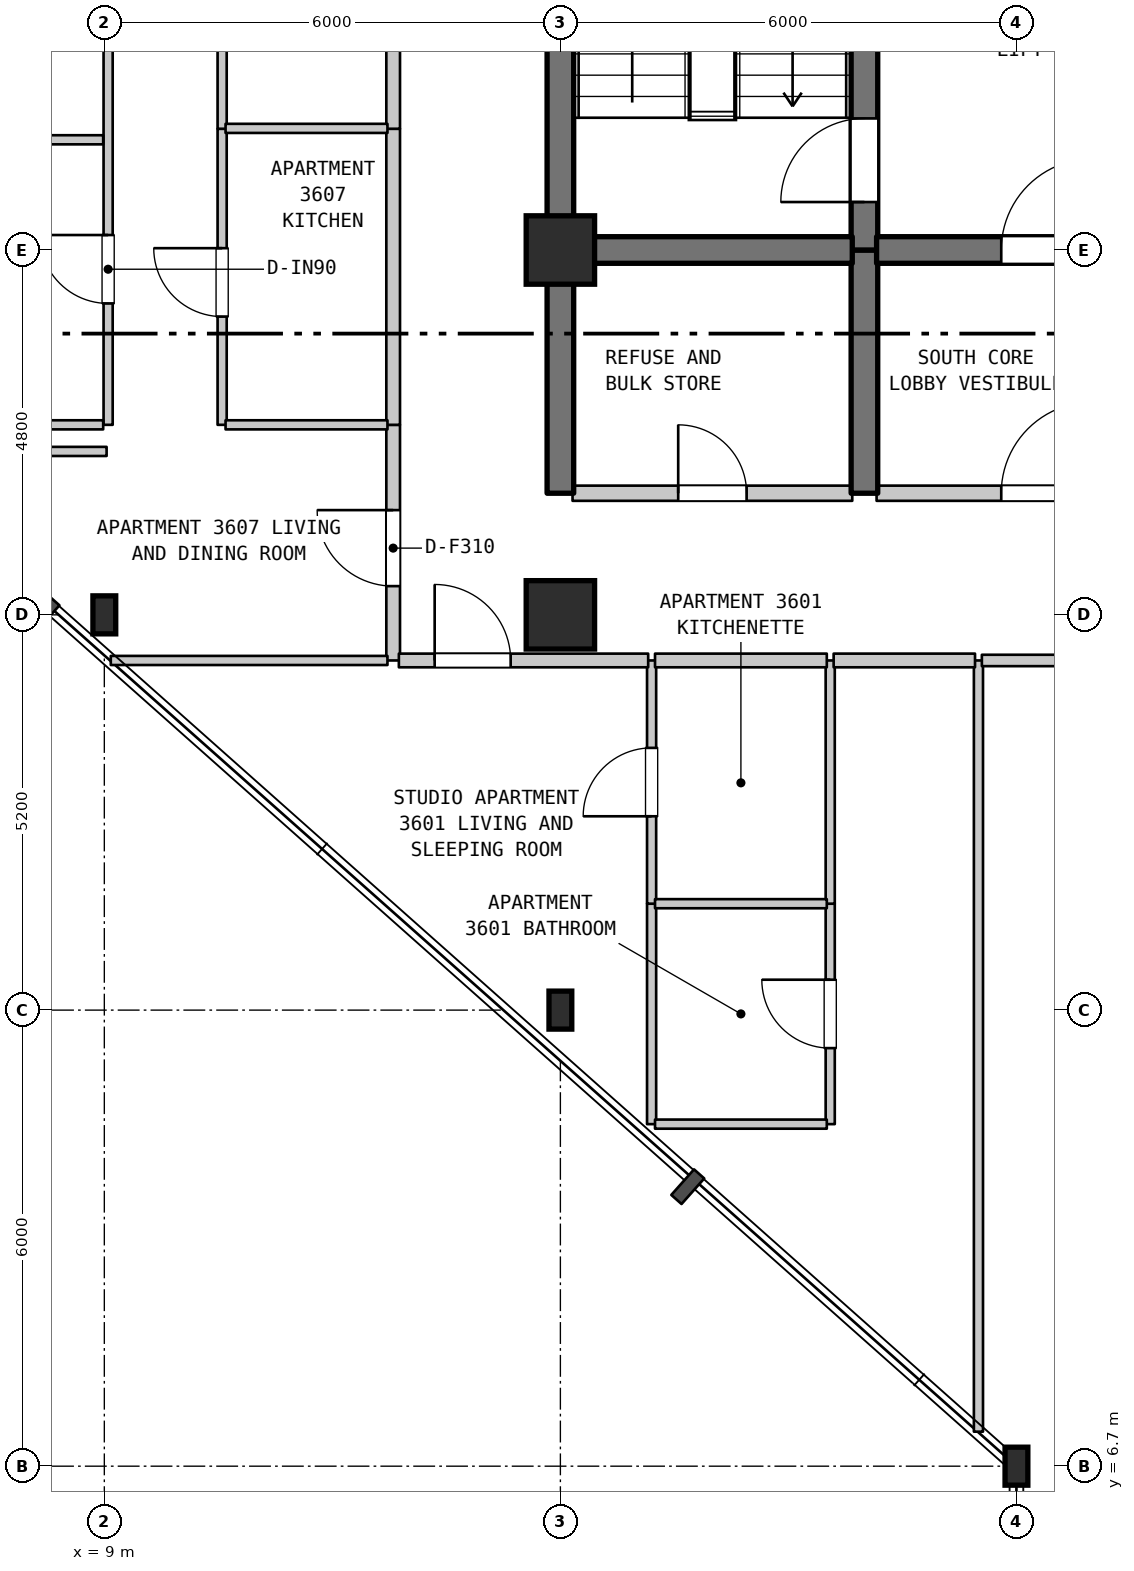
"""IFC4 building model, lengths in metres.
Left out: names, types, materials, properties, quantities, classifications, styles, units other than length and angle.
Written with IfcOpenShell. Run it as: python <this file> out.ifc"""

import sys

from ifc_helpers import new_model, si_unit, direction, frame, frame_2d, origin, origin_2d, place, context, subcontext, project, spatial, rectangle, i_section, extrude, element, fill, save


model = new_model("IFC4")
c1 = context("Model", 3, precision=1e-05, world=origin(), true_north=direction((0.0, 1.0)))
c2 = subcontext(c1, "Body", "Model", "MODEL_VIEW")
j1 = project(units=[si_unit("LENGTHUNIT", "METRE"), si_unit("PLANEANGLEUNIT", "RADIAN")], contexts=[c1])
p1 = place(None, origin())
s1 = spatial("IfcSite", under=j1, at=p1, CompositionType="ELEMENT")
p2 = place(p1, origin())
s2 = spatial("IfcBuilding", under=s1, at=p2, CompositionType="ELEMENT")
p3 = place(p2, frame((0.0, 0.0, 148.3)))
s3 = spatial("IfcBuildingStorey", under=s2, at=p3, CompositionType="ELEMENT", Elevation=148.3)
for number, where, z_axis, x_axis in (
    (1, (9.0, 17.9, 0.0), (0.0, 0.0, 1.0), (1.0, 0.0, 0.0)),
    (2, (15.0, 12.7, 0.0), (0.0, 0.0, 1.0), (1.0, 0.0, 0.0)),
):
    element("IfcColumn", number, at=place(p3, frame(where, z_axis=z_axis, x_axis=x_axis)), inside=s3, PredefinedType="COLUMN", context=c2, shape_type="SweptSolid", body=[
        extrude(i_section(OverallWidth=0.3, OverallDepth=0.5, WebThickness=0.014, FlangeThickness=0.028, FilletRadius=0.027, at=origin_2d()), origin(), (0.0, 0.0, 1.0), 3.7),
    ])
for number, where, z_axis, x_axis in (
    (3, (15.0, 17.9, 0.0), (0.0, 0.0, 1.0), (1.0, 0.0, 0.0)),
    (4, (15.0, 22.7, 0.0), (0.0, 0.0, 1.0), (1.0, 0.0, 0.0)),
):
    element("IfcColumn", number, at=place(p3, frame(where, z_axis=z_axis, x_axis=x_axis)), inside=s3, PredefinedType="COLUMN", context=c2, shape_type="SweptSolid", body=[
        extrude(rectangle(XDim=0.9, YDim=0.9, at=origin_2d()), origin(), (0.0, 0.0, 1.0), 3.7),
    ])
p4 = place(p3, frame((21.0, 6.7, 0.0), z_axis=(0.0, 0.0, 1.0), x_axis=(1.0, 0.0, 0.0)))
e5 = element("IfcColumn", 5, at=p4, inside=s3, PredefinedType="COLUMN", context=c2, shape_type="SweptSolid", body=[
    extrude(i_section(OverallWidth=0.3, OverallDepth=0.5, WebThickness=0.014, FlangeThickness=0.028, FilletRadius=0.027, at=origin_2d()), origin(), (0.0, 0.0, 1.0), 3.7),
])
p5 = place(p3, frame((9.05, 20.4, 0.0), z_axis=(0.0, 0.0, 1.0), x_axis=(0.0, 1.0, 0.0)))
e6 = element("IfcWall", 6, at=p5, inside=s3, PredefinedType="PARTITIONING", context=c2, shape_type="SweptSolid", body=[
    extrude(rectangle(XDim=7.49, YDim=0.12, at=frame_2d((3.745, 0.0))), origin(), (0.0, 0.0, 1.0), 2.785),
])
p6 = place(p5, frame((1.597, 0.0, 0.0)))
e7 = element("IfcOpeningElement", 7, at=p6, cuts=e6, PredefinedType="OPENING", context=c2, shape_type="SweptSolid", body=[
    extrude(rectangle(XDim=0.9, YDim=2.15, at=frame_2d((0.45, 1.075))), frame((0.0, 0.07, 0.0), z_axis=(0.0, -1.0, 0.0), x_axis=(1.0, 0.0, 0.0)), (0.0, 0.0, 1.0), 0.14),
])
p7 = place(p5, frame((4.992, 0.0, 0.0)))
e8 = element("IfcOpeningElement", 8, at=p7, cuts=e6, PredefinedType="OPENING", context=c2, shape_type="SweptSolid", body=[
    extrude(rectangle(XDim=0.9, YDim=2.15, at=frame_2d((0.45, 1.075))), frame((0.0, 0.07, 0.0), z_axis=(0.0, -1.0, 0.0), x_axis=(1.0, 0.0, 0.0)), (0.0, 0.0, 1.0), 0.14),
])
p8 = place(p3, frame((10.55, 20.4, 0.0), z_axis=(0.0, 0.0, 1.0), x_axis=(0.0, 1.0, 0.0)))
e9 = element("IfcWall", 9, at=p8, inside=s3, PredefinedType="PARTITIONING", context=c2, shape_type="SweptSolid", body=[
    extrude(rectangle(XDim=3.895, YDim=0.12, at=frame_2d((1.948, 0.0))), origin(), (0.0, 0.0, 1.0), 3.385),
])
p9 = place(p8, frame((1.424, 0.0, 0.0)))
e10 = element("IfcOpeningElement", 10, at=p9, cuts=e9, PredefinedType="OPENING", context=c2, shape_type="SweptSolid", body=[
    extrude(rectangle(XDim=0.9, YDim=2.15, at=frame_2d((0.45, 1.075))), frame((0.0, 0.07, 0.0), z_axis=(0.0, -1.0, 0.0), x_axis=(1.0, 0.0, 0.0)), (0.0, 0.0, 1.0), 0.14),
])
p10 = place(p3, frame((10.55, 24.295, 0.0), z_axis=(0.0, 0.0, 1.0), x_axis=(0.0, 1.0, 0.0)))
e11 = element("IfcWall", 11, at=p10, inside=s3, PredefinedType="PARTITIONING", context=c2, shape_type="SweptSolid", body=[
    extrude(rectangle(XDim=3.595, YDim=0.12, at=frame_2d((1.797, 0.0))), origin(), (0.0, 0.0, 1.0), 3.385),
])
p11 = place(p10, frame((1.275, 0.0, 0.0)))
e12 = element("IfcOpeningElement", 12, at=p11, cuts=e11, PredefinedType="OPENING", context=c2, shape_type="SweptSolid", body=[
    extrude(rectangle(XDim=0.9, YDim=2.1, at=frame_2d((0.45, 1.05))), frame((0.0, 0.07, 0.0), z_axis=(0.0, -1.0, 0.0), x_axis=(1.0, 0.0, 0.0)), (0.0, 0.0, 1.0), 0.14),
])
p12 = place(p3, frame((12.8, 17.3, 0.0), z_axis=(0.0, 0.0, 1.0), x_axis=(0.0, 1.0, 0.0)))
e13 = element("IfcWall", 13, at=p12, inside=s3, PredefinedType="STANDARD", context=c2, shape_type="SweptSolid", body=[
    extrude(rectangle(XDim=3.1, YDim=0.18, at=frame_2d((1.55, 0.0))), origin(), (0.0, 0.0, 1.0), 3.385),
])
p13 = place(p12, frame((0.978, 0.0, 0.0)))
e14 = element("IfcOpeningElement", 14, at=p13, cuts=e13, PredefinedType="OPENING", context=c2, shape_type="SweptSolid", body=[
    extrude(rectangle(XDim=1.0, YDim=2.15, at=frame_2d((0.5, 1.075))), frame((0.0, 0.1, 0.0), z_axis=(0.0, -1.0, 0.0), x_axis=(1.0, 0.0, 0.0)), (0.0, 0.0, 1.0), 0.2),
])
p14 = place(p3, frame((12.8, 20.4, 0.0), z_axis=(0.0, 0.0, 1.0), x_axis=(0.0, 1.0, 0.0)))
e15 = element("IfcWall", 15, at=p14, inside=s3, PredefinedType="STANDARD", context=c2, shape_type="SweptSolid", body=[
    extrude(rectangle(XDim=3.895, YDim=0.18, at=frame_2d((1.948, 0.0))), origin(), (0.0, 0.0, 1.0), 3.385),
])
p15 = place(p3, frame((12.8, 24.295, 0.0), z_axis=(0.0, 0.0, 1.0), x_axis=(0.0, 1.0, 0.0)))
e16 = element("IfcWall", 16, at=p15, inside=s3, PredefinedType="STANDARD", context=c2, shape_type="SweptSolid", body=[
    extrude(rectangle(XDim=3.595, YDim=0.18, at=frame_2d((1.797, 0.0))), origin(), (0.0, 0.0, 1.0), 3.385),
])
p16 = place(p3, frame((15.0, 19.5, 0.0), z_axis=(0.0, 0.0, 1.0), x_axis=(0.0, 1.0, 0.0)))
e17 = element("IfcWall", 17, at=p16, inside=s3, PredefinedType="SHEAR", context=c2, shape_type="SweptSolid", body=[
    extrude(rectangle(XDim=3.2, YDim=0.35, at=frame_2d((1.6, 0.0))), origin(), (0.0, 0.0, 1.0), 3.385),
])
p17 = place(p3, frame((15.0, 22.7, 0.0), z_axis=(0.0, 0.0, 1.0), x_axis=(0.0, 1.0, 0.0)))
e18 = element("IfcWall", 18, at=p17, inside=s3, PredefinedType="SHEAR", context=c2, shape_type="SweptSolid", body=[
    extrude(rectangle(XDim=6.8, YDim=0.35, at=frame_2d((3.4, 0.0))), origin(), (0.0, 0.0, 1.0), 3.385),
])
p18 = place(p3, frame((16.2, 11.2, 0.0), z_axis=(0.0, 0.0, 1.0), x_axis=(0.0, 1.0, 0.0)))
e19 = element("IfcWall", 19, at=p18, inside=s3, PredefinedType="PARTITIONING", context=c2, shape_type="SweptSolid", body=[
    extrude(rectangle(XDim=2.9, YDim=0.12, at=frame_2d((1.45, 0.0))), origin(), (0.0, 0.0, 1.0), 3.385),
])
p19 = place(p3, frame((16.2, 14.1, 0.0), z_axis=(0.0, 0.0, 1.0), x_axis=(0.0, 1.0, 0.0)))
e20 = element("IfcWall", 20, at=p19, inside=s3, PredefinedType="PARTITIONING", context=c2, shape_type="SweptSolid", body=[
    extrude(rectangle(XDim=3.2, YDim=0.12, at=frame_2d((1.6, 0.0))), origin(), (0.0, 0.0, 1.0), 3.385),
])
p20 = place(p19, frame((1.15, 0.0, 0.0)))
e21 = element("IfcOpeningElement", 21, at=p20, cuts=e20, PredefinedType="OPENING", context=c2, shape_type="SweptSolid", body=[
    extrude(rectangle(XDim=0.9, YDim=2.15, at=frame_2d((0.45, 1.075))), frame((0.0, 0.07, 0.0), z_axis=(0.0, -1.0, 0.0), x_axis=(1.0, 0.0, 0.0)), (0.0, 0.0, 1.0), 0.14),
])
p21 = place(p3, frame((18.55, 11.2, 0.0), z_axis=(0.0, 0.0, 1.0), x_axis=(0.0, 1.0, 0.0)))
e22 = element("IfcWall", 22, at=p21, inside=s3, PredefinedType="PARTITIONING", context=c2, shape_type="SweptSolid", body=[
    extrude(rectangle(XDim=2.9, YDim=0.12, at=frame_2d((1.45, 0.0))), origin(), (0.0, 0.0, 1.0), 3.385),
])
p22 = place(p21, frame((1.0, 0.0, 0.0)))
e23 = element("IfcOpeningElement", 23, at=p22, cuts=e22, PredefinedType="OPENING", context=c2, shape_type="SweptSolid", body=[
    extrude(rectangle(XDim=0.9, YDim=2.1, at=frame_2d((0.45, 1.05))), frame((0.0, 0.07, 0.0), z_axis=(0.0, -1.0, 0.0), x_axis=(1.0, 0.0, 0.0)), (0.0, 0.0, 1.0), 0.14),
])
p23 = place(p3, frame((18.55, 14.1, 0.0), z_axis=(0.0, 0.0, 1.0), x_axis=(0.0, 1.0, 0.0)))
e24 = element("IfcWall", 24, at=p23, inside=s3, PredefinedType="PARTITIONING", context=c2, shape_type="SweptSolid", body=[
    extrude(rectangle(XDim=3.2, YDim=0.12, at=frame_2d((1.6, 0.0))), origin(), (0.0, 0.0, 1.0), 3.385),
])
p24 = place(p3, frame((19.0, 19.5, 0.0), z_axis=(0.0, 0.0, 1.0), x_axis=(0.0, 1.0, 0.0)))
e25 = element("IfcWall", 25, at=p24, inside=s3, PredefinedType="SHEAR", context=c2, shape_type="SweptSolid", body=[
    extrude(rectangle(XDim=3.2, YDim=0.35, at=frame_2d((1.6, 0.0))), origin(), (0.0, 0.0, 1.0), 3.385),
])
p25 = place(p3, frame((19.0, 22.7, 0.0), z_axis=(0.0, 0.0, 1.0), x_axis=(0.0, 1.0, 0.0)))
e26 = element("IfcWall", 26, at=p25, inside=s3, PredefinedType="SHEAR", context=c2, shape_type="SweptSolid", body=[
    extrude(rectangle(XDim=5.5, YDim=0.35, at=frame_2d((2.75, 0.0))), origin(), (0.0, 0.0, 1.0), 3.385),
])
p26 = place(p25, frame((0.631, 0.0, 0.0)))
e27 = element("IfcOpeningElement", 27, at=p26, cuts=e26, PredefinedType="OPENING", context=c2, shape_type="SweptSolid", body=[
    extrude(rectangle(XDim=1.1, YDim=2.15, at=frame_2d((0.55, 1.075))), frame((0.0, 0.185, 0.0), z_axis=(0.0, -1.0, 0.0), x_axis=(1.0, 0.0, 0.0)), (0.0, 0.0, 1.0), 0.37),
])
p27 = place(p3, frame((20.5, 7.154, 0.0), z_axis=(0.0, 0.0, 1.0), x_axis=(0.0, 1.0, 0.0)))
e28 = element("IfcWall", 28, at=p27, inside=s3, PredefinedType="PARTITIONING", context=c2, shape_type="SweptSolid", body=[
    extrude(rectangle(XDim=10.146, YDim=0.12, at=frame_2d((5.073, 0.0))), origin(), (0.0, 0.0, 1.0), 3.385),
])
for number, where, z_axis, x_axis in (
    (29, (16.245, 11.2, 0.0), (0.0, 0.0, 1.0), (1.0, 0.0, 0.0)),
    (30, (16.245, 14.1, 0.0), (0.0, 0.0, 1.0), (1.0, 0.0, 0.0)),
):
    element("IfcWall", number, at=place(p3, frame(where, z_axis=z_axis, x_axis=x_axis)), inside=s3, PredefinedType="PARTITIONING", context=c2, shape_type="SweptSolid", body=[
        extrude(rectangle(XDim=2.26, YDim=0.12, at=frame_2d((1.13, 0.0))), origin(), (0.0, 0.0, 1.0), 3.385),
    ])
p28 = place(p3, frame((9.085, 17.3, 0.0), z_axis=(0.0, 0.0, 1.0), x_axis=(1.0, 0.0, 0.0)))
e31 = element("IfcWall", 31, at=p28, inside=s3, PredefinedType="PARTITIONING", context=c2, shape_type="SweptSolid", body=[
    extrude(rectangle(XDim=3.64, YDim=0.12, at=frame_2d((1.82, 0.0))), origin(), (0.0, 0.0, 1.0), 3.385),
])
p29 = place(p3, frame((12.875, 17.3, 0.0), z_axis=(0.0, 0.0, 1.0), x_axis=(1.0, 0.0, 0.0)))
e32 = element("IfcWall", 32, at=p29, inside=s3, PredefinedType="STANDARD", context=c2, shape_type="SweptSolid", body=[
    extrude(rectangle(XDim=3.28, YDim=0.18, at=frame_2d((1.64, 0.0))), origin(), (0.0, 0.0, 1.0), 3.385),
])
p30 = place(p29, frame((0.471, 0.0, 0.0)))
e33 = element("IfcOpeningElement", 33, at=p30, cuts=e32, PredefinedType="OPENING", context=c2, shape_type="SweptSolid", body=[
    extrude(rectangle(XDim=1.0, YDim=2.15, at=frame_2d((0.5, 1.075))), frame((0.0, 0.1, 0.0), z_axis=(0.0, -1.0, 0.0), x_axis=(1.0, 0.0, 0.0)), (0.0, 0.0, 1.0), 0.2),
])
p31 = place(p3, frame((16.245, 17.3, 0.0), z_axis=(0.0, 0.0, 1.0), x_axis=(1.0, 0.0, 0.0)))
e34 = element("IfcWall", 34, at=p31, inside=s3, PredefinedType="STANDARD", context=c2, shape_type="SweptSolid", body=[
    extrude(rectangle(XDim=2.26, YDim=0.18, at=frame_2d((1.13, 0.0))), origin(), (0.0, 0.0, 1.0), 3.385),
])
p32 = place(p3, frame((18.595, 17.3, 0.0), z_axis=(0.0, 0.0, 1.0), x_axis=(1.0, 0.0, 0.0)))
e35 = element("IfcWall", 35, at=p32, inside=s3, PredefinedType="STANDARD", context=c2, shape_type="SweptSolid", body=[
    extrude(rectangle(XDim=1.86, YDim=0.18, at=frame_2d((0.93, 0.0))), origin(), (0.0, 0.0, 1.0), 3.385),
])
p33 = place(p3, frame((20.545, 17.3, 0.0), z_axis=(0.0, 0.0, 1.0), x_axis=(1.0, 0.0, 0.0)))
e36 = element("IfcWall", 36, at=p33, inside=s3, PredefinedType="STANDARD", context=c2, shape_type="SweptSolid", body=[
    extrude(rectangle(XDim=4.91, YDim=0.15, at=frame_2d((2.455, 0.0))), origin(), (0.0, 0.0, 1.0), 3.385),
])
p34 = place(p33, frame((1.884, 0.0, 0.0)))
e37 = element("IfcOpeningElement", 37, at=p34, cuts=e36, PredefinedType="OPENING", context=c2, shape_type="SweptSolid", body=[
    extrude(rectangle(XDim=1.0, YDim=2.15, at=frame_2d((0.5, 1.075))), frame((0.0, 0.085, 0.0), z_axis=(0.0, -1.0, 0.0), x_axis=(1.0, 0.0, 0.0)), (0.0, 0.0, 1.0), 0.17),
])
p35 = place(p3, frame((15.16, 19.5, 0.0), z_axis=(0.0, 0.0, 1.0), x_axis=(1.0, 0.0, 0.0)))
e38 = element("IfcWall", 38, at=p35, inside=s3, PredefinedType="STANDARD", context=c2, shape_type="SweptSolid", body=[
    extrude(rectangle(XDim=3.68, YDim=0.2, at=frame_2d((1.84, 0.0))), origin(), (0.0, 0.0, 1.0), 3.385),
])
p36 = place(p35, frame((1.39, 0.0, 0.0)))
e39 = element("IfcOpeningElement", 39, at=p36, cuts=e38, PredefinedType="OPENING", context=c2, shape_type="SweptSolid", body=[
    extrude(rectangle(XDim=0.9, YDim=2.15, at=frame_2d((0.45, 1.075))), frame((0.0, 0.11, 0.0), z_axis=(0.0, -1.0, 0.0), x_axis=(1.0, 0.0, 0.0)), (0.0, 0.0, 1.0), 0.22),
])
p37 = place(p3, frame((19.16, 19.5, 0.0), z_axis=(0.0, 0.0, 1.0), x_axis=(1.0, 0.0, 0.0)))
e40 = element("IfcWall", 40, at=p37, inside=s3, PredefinedType="STANDARD", context=c2, shape_type="SweptSolid", body=[
    extrude(rectangle(XDim=4.48, YDim=0.2, at=frame_2d((2.24, 0.0))), origin(), (0.0, 0.0, 1.0), 3.385),
])
p38 = place(p37, frame((1.64, 0.0, 0.0)))
e41 = element("IfcOpeningElement", 41, at=p38, cuts=e40, PredefinedType="OPENING", context=c2, shape_type="SweptSolid", body=[
    extrude(rectangle(XDim=1.2, YDim=2.2, at=frame_2d((0.6, 1.1))), frame((0.0, 0.11, 0.0), z_axis=(0.0, -1.0, 0.0), x_axis=(1.0, 0.0, 0.0)), (0.0, 0.0, 1.0), 0.22),
])
p39 = place(p3, frame((5.991, 20.05, 0.0), z_axis=(0.0, 0.0, 1.0), x_axis=(1.0, 0.0, 0.0)))
e42 = element("IfcWall", 42, at=p39, inside=s3, PredefinedType="PARTITIONING", context=c2, shape_type="SweptSolid", body=[
    extrude(rectangle(XDim=3.039, YDim=0.12, at=frame_2d((1.52, 0.0))), origin(), (0.0, 0.0, 1.0), 3.385),
])
p40 = place(p3, frame((5.598, 20.4, 0.0), z_axis=(0.0, 0.0, 1.0), x_axis=(1.0, 0.0, 0.0)))
e43 = element("IfcWall", 43, at=p40, inside=s3, PredefinedType="PARTITIONING", context=c2, shape_type="SweptSolid", body=[
    extrude(rectangle(XDim=3.387, YDim=0.12, at=frame_2d((1.694, 0.0))), origin(), (0.0, 0.0, 1.0), 3.385),
])
p41 = place(p3, frame((10.595, 20.4, 0.0), z_axis=(0.0, 0.0, 1.0), x_axis=(1.0, 0.0, 0.0)))
e44 = element("IfcWall", 44, at=p41, inside=s3, PredefinedType="PARTITIONING", context=c2, shape_type="SweptSolid", body=[
    extrude(rectangle(XDim=2.13, YDim=0.12, at=frame_2d((1.065, 0.0))), origin(), (0.0, 0.0, 1.0), 3.385),
])
p42 = place(p3, frame((15.16, 22.7, 0.0), z_axis=(0.0, 0.0, 1.0), x_axis=(1.0, 0.0, 0.0)))
e45 = element("IfcWall", 45, at=p42, inside=s3, PredefinedType="SHEAR", context=c2, shape_type="SweptSolid", body=[
    extrude(rectangle(XDim=3.68, YDim=0.35, at=frame_2d((1.84, 0.0))), origin(), (0.0, 0.0, 1.0), 3.385),
])
p43 = place(p3, frame((19.16, 22.7, 0.0), z_axis=(0.0, 0.0, 1.0), x_axis=(1.0, 0.0, 0.0)))
e46 = element("IfcWall", 46, at=p43, inside=s3, PredefinedType="SHEAR", context=c2, shape_type="SweptSolid", body=[
    extrude(rectangle(XDim=4.48, YDim=0.35, at=frame_2d((2.24, 0.0))), origin(), (0.0, 0.0, 1.0), 3.385),
])
p44 = place(p43, frame((1.64, 0.0, 0.0)))
e47 = element("IfcOpeningElement", 47, at=p44, cuts=e46, PredefinedType="OPENING", context=c2, shape_type="SweptSolid", body=[
    extrude(rectangle(XDim=1.2, YDim=2.2, at=frame_2d((0.6, 1.1))), frame((0.0, 0.185, 0.0), z_axis=(0.0, -1.0, 0.0), x_axis=(1.0, 0.0, 0.0)), (0.0, 0.0, 1.0), 0.37),
])
p45 = place(p3, frame((3.567, 24.15, 0.0), z_axis=(0.0, 0.0, 1.0), x_axis=(1.0, 0.0, 0.0)))
e48 = element("IfcWall", 48, at=p45, inside=s3, PredefinedType="PARTITIONING", context=c2, shape_type="SweptSolid", body=[
    extrude(rectangle(XDim=5.418, YDim=0.12, at=frame_2d((2.709, 0.0))), origin(), (0.0, 0.0, 1.0), 3.385),
])
p46 = place(p3, frame((10.595, 24.3, 0.0), z_axis=(0.0, 0.0, 1.0), x_axis=(1.0, 0.0, 0.0)))
e49 = element("IfcWall", 49, at=p46, inside=s3, PredefinedType="PARTITIONING", context=c2, shape_type="SweptSolid", body=[
    extrude(rectangle(XDim=2.13, YDim=0.12, at=frame_2d((1.065, 0.0))), origin(), (0.0, 0.0, 1.0), 3.385),
])
p47 = place(p6, origin())
e50 = element("IfcDoor", 50, at=p47, inside=s3, OperationType="SINGLE_SWING_RIGHT", PredefinedType="DOOR", context=c2, shape_type="SweptSolid", body=[
    extrude(rectangle(XDim=0.9, YDim=2.15, at=frame_2d((0.45, 1.075))), frame((0.0, 0.025, 0.0), z_axis=(0.0, -1.0, 0.0), x_axis=(1.0, 0.0, 0.0)), (0.0, 0.0, 1.0), 0.05),
])
fill(e7, e50)
p48 = place(p9, origin())
e51 = element("IfcDoor", 51, at=p48, inside=s3, OperationType="SINGLE_SWING_RIGHT", PredefinedType="DOOR", context=c2, shape_type="SweptSolid", body=[
    extrude(rectangle(XDim=0.9, YDim=2.15, at=frame_2d((0.45, 1.075))), frame((0.0, 0.025, 0.0), z_axis=(0.0, -1.0, 0.0), x_axis=(1.0, 0.0, 0.0)), (0.0, 0.0, 1.0), 0.05),
])
fill(e10, e51)
p49 = place(p13, origin())
e52 = element("IfcDoor", 52, at=p49, inside=s3, OperationType="SINGLE_SWING_RIGHT", PredefinedType="DOOR", context=c2, shape_type="SweptSolid", body=[
    extrude(rectangle(XDim=1.0, YDim=2.15, at=frame_2d((0.5, 1.075))), frame((0.0, 0.025, 0.0), z_axis=(0.0, -1.0, 0.0), x_axis=(1.0, 0.0, 0.0)), (0.0, 0.0, 1.0), 0.05),
])
fill(e14, e52)
p50 = place(p20, origin())
e53 = element("IfcDoor", 53, at=p50, inside=s3, OperationType="SINGLE_SWING_LEFT", PredefinedType="DOOR", context=c2, shape_type="SweptSolid", body=[
    extrude(rectangle(XDim=0.9, YDim=2.15, at=frame_2d((0.45, 1.075))), frame((0.0, 0.025, 0.0), z_axis=(0.0, -1.0, 0.0), x_axis=(1.0, 0.0, 0.0)), (0.0, 0.0, 1.0), 0.05),
])
fill(e21, e53)
p51 = place(p22, origin())
e54 = element("IfcDoor", 54, at=p51, inside=s3, OperationType="SINGLE_SWING_RIGHT", PredefinedType="DOOR", context=c2, shape_type="SweptSolid", body=[
    extrude(rectangle(XDim=0.9, YDim=2.1, at=frame_2d((0.45, 1.05))), frame((0.0, 0.025, 0.0), z_axis=(0.0, -1.0, 0.0), x_axis=(1.0, 0.0, 0.0)), (0.0, 0.0, 1.0), 0.05),
])
fill(e23, e54)
p52 = place(p26, origin())
e55 = element("IfcDoor", 55, at=p52, inside=s3, OperationType="SINGLE_SWING_LEFT", PredefinedType="DOOR", context=c2, shape_type="SweptSolid", body=[
    extrude(rectangle(XDim=1.1, YDim=2.15, at=frame_2d((0.55, 1.075))), frame((0.0, 0.025, 0.0), z_axis=(0.0, -1.0, 0.0), x_axis=(1.0, 0.0, 0.0)), (0.0, 0.0, 1.0), 0.05),
])
fill(e27, e55)
p53 = place(p30, origin())
e56 = element("IfcDoor", 56, at=p53, inside=s3, OperationType="SINGLE_SWING_LEFT", PredefinedType="DOOR", context=c2, shape_type="SweptSolid", body=[
    extrude(rectangle(XDim=1.0, YDim=2.15, at=frame_2d((0.5, 1.075))), frame((0.0, 0.025, 0.0), z_axis=(0.0, -1.0, 0.0), x_axis=(1.0, 0.0, 0.0)), (0.0, 0.0, 1.0), 0.05),
])
fill(e33, e56)
p54 = place(p36, origin())
e57 = element("IfcDoor", 57, at=p54, inside=s3, OperationType="SINGLE_SWING_LEFT", PredefinedType="DOOR", context=c2, shape_type="SweptSolid", body=[
    extrude(rectangle(XDim=0.9, YDim=2.15, at=frame_2d((0.45, 1.075))), frame((0.0, 0.025, 0.0), z_axis=(0.0, -1.0, 0.0), x_axis=(1.0, 0.0, 0.0)), (0.0, 0.0, 1.0), 0.05),
])
fill(e39, e57)
p55 = place(p38, origin())
e58 = element("IfcDoor", 58, at=p55, inside=s3, OperationType="SINGLE_SWING_RIGHT", PredefinedType="DOOR", context=c2, shape_type="SweptSolid", body=[
    extrude(rectangle(XDim=1.2, YDim=2.2, at=frame_2d((0.6, 1.1))), frame((0.0, 0.025, 0.0), z_axis=(0.0, -1.0, 0.0), x_axis=(1.0, 0.0, 0.0)), (0.0, 0.0, 1.0), 0.05),
])
fill(e41, e58)
p56 = place(p44, origin())
e59 = element("IfcDoor", 59, at=p56, inside=s3, OperationType="SINGLE_SWING_RIGHT", PredefinedType="DOOR", context=c2, shape_type="SweptSolid", body=[
    extrude(rectangle(XDim=1.2, YDim=2.2, at=frame_2d((0.6, 1.1))), frame((0.0, 0.025, 0.0), z_axis=(0.0, -1.0, 0.0), x_axis=(1.0, 0.0, 0.0)), (0.0, 0.0, 1.0), 0.05),
])
fill(e47, e59)
save(model, sys.argv[1])
